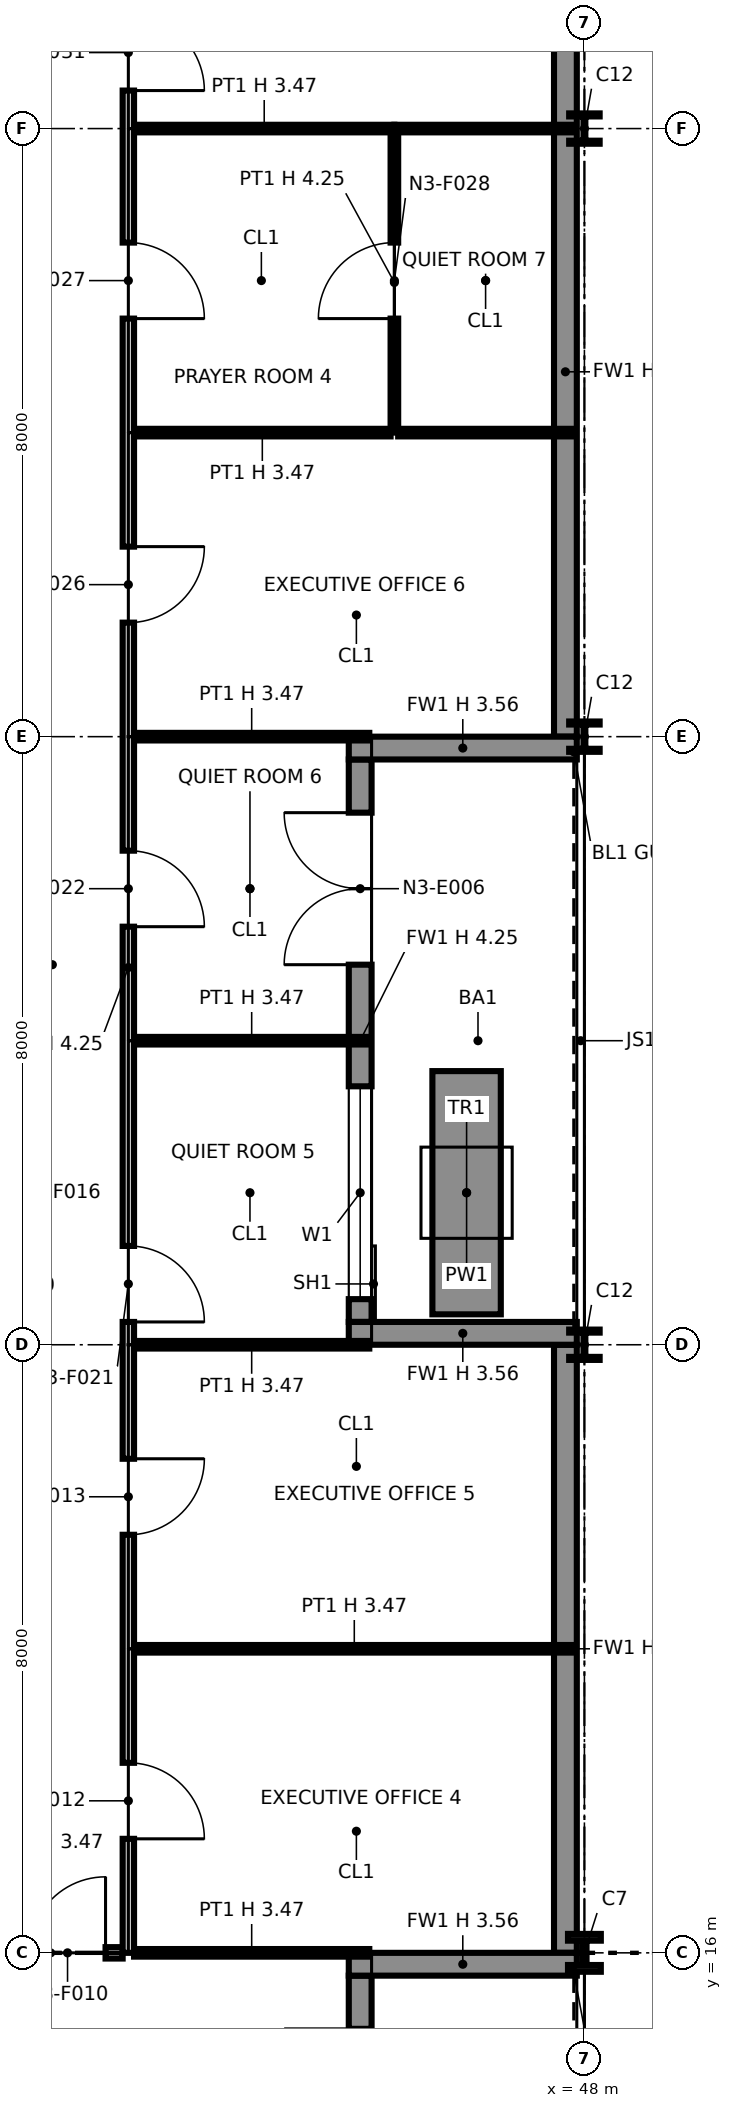
"""IFC4 building model, lengths in metres.
Left out: names, types, materials, properties, quantities, classifications, styles, units other than length and angle.
Written with IfcOpenShell. Run it as: python <this file> out.ifc"""

import sys

from ifc_helpers import new_model, si_unit, direction, frame, frame_2d, origin, origin_2d, place, context, subcontext, project, spatial, polyline, rectangle, i_section, outline, extrude, element, fill, save


model = new_model("IFC4")
c1 = context("Model", 3, precision=1e-05, world=origin(), true_north=direction((0.0, 1.0)))
c2 = subcontext(c1, "Body", "Model", "MODEL_VIEW")
j1 = project(units=[si_unit("LENGTHUNIT", "METRE"), si_unit("PLANEANGLEUNIT", "RADIAN")], contexts=[c1])
p1 = place(None, origin())
s1 = spatial("IfcSite", under=j1, at=p1, CompositionType="ELEMENT")
p2 = place(p1, origin())
s2 = spatial("IfcBuilding", under=s1, at=p2, CompositionType="ELEMENT")
p3 = place(p2, frame((0.0, 0.0, 70.0)))
s3 = spatial("IfcBuildingStorey", under=s2, at=p3, CompositionType="ELEMENT", Elevation=70.0)
p4 = place(p3, frame((48.0, 16.0, 0.0), z_axis=(0.0, 0.0, 1.0), x_axis=(1.0, 0.0, 0.0)))
e1 = element("IfcColumn", 1, at=p4, inside=s3, PredefinedType="COLUMN", context=c2, shape_type="SweptSolid", body=[
    extrude(i_section(OverallWidth=0.432, OverallDepth=0.498, WebThickness=0.056, FlangeThickness=0.089, at=origin_2d()), origin(), (0.0, 0.0, 1.0), 4.25),
])
for number, where, z_axis, x_axis in (
    (2, (48.0, 24.0, 0.0), (0.0, 0.0, 1.0), (1.0, 0.0, 0.0)),
    (3, (48.0, 32.0, 0.0), (0.0, 0.0, 1.0), (1.0, 0.0, 0.0)),
    (4, (48.0, 40.0, 0.0), (0.0, 0.0, 1.0), (1.0, 0.0, 0.0)),
):
    element("IfcColumn", number, at=place(p3, frame(where, z_axis=z_axis, x_axis=x_axis)), inside=s3, PredefinedType="COLUMN", context=c2, shape_type="SweptSolid", body=[
        extrude(i_section(OverallWidth=0.401, OverallDepth=0.399, WebThickness=0.025, FlangeThickness=0.04, at=origin_2d()), origin(), (0.0, 0.0, 1.0), 4.25),
    ])
p5 = place(p3, frame((45.05, 8.3, 0.0), z_axis=(0.0, 0.0, 1.0), x_axis=(0.0, 1.0, 0.0)))
e5 = element("IfcWall", 5, at=p5, inside=s3, PredefinedType="SOLIDWALL", context=c2, shape_type="SweptSolid", body=[
    extrude(rectangle(XDim=7.4, YDim=0.3, at=frame_2d((3.7, 0.0))), origin(), (0.0, 0.0, 1.0), 4.25),
])
p6 = place(p5, frame((0.3, 0.0, 0.9)))
e6 = element("IfcOpeningElement", 6, at=p6, cuts=e5, PredefinedType="OPENING", context=c2, shape_type="SweptSolid", body=[
    extrude(rectangle(XDim=2.8, YDim=2.2, at=frame_2d((1.4, 1.1))), frame((0.0, 0.16, 0.0), z_axis=(0.0, -1.0, 0.0), x_axis=(1.0, 0.0, 0.0)), (0.0, 0.0, 1.0), 0.32),
])
p7 = place(p5, frame((4.7, 0.0, 0.0)))
e7 = element("IfcOpeningElement", 7, at=p7, cuts=e5, PredefinedType="OPENING", context=c2, shape_type="SweptSolid", body=[
    extrude(rectangle(XDim=2.0, YDim=2.4, at=frame_2d((1.0, 1.2))), frame((0.0, 0.16, 0.0), z_axis=(0.0, -1.0, 0.0), x_axis=(1.0, 0.0, 0.0)), (0.0, 0.0, 1.0), 0.32),
])
p8 = place(p3, frame((47.9, 15.85, 0.0), z_axis=(0.0, 0.0, 1.0), x_axis=(-1.0, 0.0, 0.0)))
e8 = element("IfcWall", 8, at=p8, inside=s3, PredefinedType="SOLIDWALL", context=c2, shape_type="SweptSolid", body=[
    extrude(rectangle(XDim=3.0, YDim=0.3, at=frame_2d((1.5, 0.0))), origin(), (0.0, 0.0, 1.0), 3.556),
])
p9 = place(p3, frame((47.75, 16.0, 0.0), z_axis=(0.0, 0.0, 1.0), x_axis=(0.0, 1.0, 0.0)))
e9 = element("IfcWall", 9, at=p9, inside=s3, PredefinedType="SOLIDWALL", context=c2, shape_type="SweptSolid", body=[
    extrude(rectangle(XDim=8.0, YDim=0.3, at=frame_2d((4.0, 0.0))), origin(), (0.0, 0.0, 1.0), 4.25),
])
p10 = place(p3, frame((45.05, 24.3, 0.0), z_axis=(0.0, 0.0, 1.0), x_axis=(0.0, 1.0, 0.0)))
e10 = element("IfcWall", 10, at=p10, inside=s3, PredefinedType="SOLIDWALL", context=c2, shape_type="SweptSolid", body=[
    extrude(rectangle(XDim=7.4, YDim=0.3, at=frame_2d((3.7, 0.0))), origin(), (0.0, 0.0, 1.0), 4.25),
])
p11 = place(p10, frame((0.3, 0.0, 0.9)))
e11 = element("IfcOpeningElement", 11, at=p11, cuts=e10, PredefinedType="OPENING", context=c2, shape_type="SweptSolid", body=[
    extrude(rectangle(XDim=2.8, YDim=2.2, at=frame_2d((1.4, 1.1))), frame((0.0, 0.16, 0.0), z_axis=(0.0, -1.0, 0.0), x_axis=(1.0, 0.0, 0.0)), (0.0, 0.0, 1.0), 0.32),
])
p12 = place(p10, frame((4.7, 0.0, 0.0)))
e12 = element("IfcOpeningElement", 12, at=p12, cuts=e10, PredefinedType="OPENING", context=c2, shape_type="SweptSolid", body=[
    extrude(rectangle(XDim=2.0, YDim=2.4, at=frame_2d((1.0, 1.2))), frame((0.0, 0.16, 0.0), z_axis=(0.0, -1.0, 0.0), x_axis=(1.0, 0.0, 0.0)), (0.0, 0.0, 1.0), 0.32),
])
for number, where, z_axis, x_axis in (
    (13, (47.9, 24.15, 0.0), (0.0, 0.0, 1.0), (-1.0, 0.0, 0.0)),
    (14, (47.9, 31.85, 0.0), (0.0, 0.0, 1.0), (-1.0, 0.0, 0.0)),
):
    element("IfcWall", number, at=place(p3, frame(where, z_axis=z_axis, x_axis=x_axis)), inside=s3, PredefinedType="SOLIDWALL", context=c2, shape_type="SweptSolid", body=[
        extrude(rectangle(XDim=3.0, YDim=0.3, at=frame_2d((1.5, 0.0))), origin(), (0.0, 0.0, 1.0), 3.556),
    ])
p13 = place(p3, frame((47.75, 32.0, 0.0), z_axis=(0.0, 0.0, 1.0), x_axis=(0.0, 1.0, 0.0)))
e15 = element("IfcWall", 15, at=p13, inside=s3, PredefinedType="SOLIDWALL", context=c2, shape_type="SweptSolid", body=[
    extrude(rectangle(XDim=9.6, YDim=0.3, at=frame_2d((4.8, 0.0))), origin(), (0.0, 0.0, 1.0), 4.25),
])
p14 = place(p3, frame((46.45, 24.4, 0.0), z_axis=(0.0, 0.0, 1.0), x_axis=(0.0, 1.0, 0.0)))
e16 = element("IfcWall", 16, at=p14, inside=s3, PredefinedType="SOLIDWALL", context=c2, shape_type="SweptSolid", body=[
    extrude(rectangle(XDim=3.2, YDim=0.9, at=frame_2d((1.6, 0.0))), origin(), (0.0, 0.0, 1.0), 0.6),
])
p15 = place(p3, frame((40.03, 16.0, 0.0), z_axis=(0.0, 0.0, 1.0), x_axis=(1.0, 0.0, 0.0)))
e17 = element("IfcWall", 17, at=p15, inside=s3, PredefinedType="PARTITIONING", context=c2, shape_type="SweptSolid", body=[
    extrude(rectangle(XDim=1.895, YDim=0.15, at=frame_2d((0.948, 0.0))), origin(), (0.0, 0.0, 1.0), 3.47),
])
p16 = place(p15, frame((0.67, 0.0, 0.0)))
e18 = element("IfcOpeningElement", 18, at=p16, cuts=e17, PredefinedType="OPENING", context=c2, shape_type="SweptSolid", body=[
    extrude(rectangle(XDim=1.0, YDim=2.1, at=frame_2d((0.5, 1.05))), frame((0.0, 0.085, 0.0), z_axis=(0.0, -1.0, 0.0), x_axis=(1.0, 0.0, 0.0)), (0.0, 0.0, 1.0), 0.17),
])
p17 = place(p3, frame((42.075, 16.0, 0.0), z_axis=(0.0, 0.0, 1.0), x_axis=(1.0, 0.0, 0.0)))
e19 = element("IfcWall", 19, at=p17, inside=s3, PredefinedType="PARTITIONING", context=c2, shape_type="SweptSolid", body=[
    extrude(rectangle(XDim=3.095, YDim=0.1, at=frame_2d((1.547, 0.0))), origin(), (0.0, 0.0, 1.0), 3.47),
])
p18 = place(p3, frame((42.0, 16.0, 0.0), z_axis=(0.0, 0.0, 1.0), x_axis=(0.0, 1.0, 0.0)))
e20 = element("IfcWall", 20, at=p18, inside=s3, PredefinedType="PARTITIONING", context=c2, shape_type="SweptSolid", body=[
    extrude(outline(polyline([(0.0, 0.0), (25.925, 0.0), (25.925, 4.25), (24.3, 4.25), (24.298, 3.47), (23.702, 3.47), (23.7, 4.25), (20.3, 4.25), (20.298, 3.47), (19.702, 3.47), (19.7, 4.25), (16.3, 4.25), (16.298, 3.47), (15.702, 3.47), (15.7, 4.25), (12.3, 4.25), (12.298, 3.47), (11.702, 3.47), (11.7, 4.25), (8.3, 4.25), (8.298, 3.47), (7.702, 3.47), (7.7, 4.25), (4.3, 4.25), (4.298, 3.47), (3.702, 3.47), (3.7, 4.25), (0.0, 4.25), (0.0, 0.0)])), frame((0.0, 0.075, 0.0), z_axis=(0.0, -1.0, 0.0), x_axis=(1.0, 0.0, 0.0)), (0.0, 0.0, 1.0), 0.15),
])
p19 = place(p18, frame((2.5, 0.0, 0.0), z_axis=(0.0, 0.0, 1.0), x_axis=(-1.0, 0.0, 0.0)))
e21 = element("IfcOpeningElement", 21, at=p19, cuts=e20, PredefinedType="OPENING", context=c2, shape_type="SweptSolid", body=[
    extrude(rectangle(XDim=1.0, YDim=2.1, at=frame_2d((0.5, 1.05))), frame((0.0, 0.085, 0.0), z_axis=(0.0, -1.0, 0.0), x_axis=(1.0, 0.0, 0.0)), (0.0, 0.0, 1.0), 0.17),
])
p20 = place(p18, frame((6.5, 0.0, 0.0), z_axis=(0.0, 0.0, 1.0), x_axis=(-1.0, 0.0, 0.0)))
e22 = element("IfcOpeningElement", 22, at=p20, cuts=e20, PredefinedType="OPENING", context=c2, shape_type="SweptSolid", body=[
    extrude(rectangle(XDim=1.0, YDim=2.1, at=frame_2d((0.5, 1.05))), frame((0.0, 0.085, 0.0), z_axis=(0.0, -1.0, 0.0), x_axis=(1.0, 0.0, 0.0)), (0.0, 0.0, 1.0), 0.17),
])
p21 = place(p18, frame((9.3, 0.0, 0.0), z_axis=(0.0, 0.0, 1.0), x_axis=(-1.0, 0.0, 0.0)))
e23 = element("IfcOpeningElement", 23, at=p21, cuts=e20, PredefinedType="OPENING", context=c2, shape_type="SweptSolid", body=[
    extrude(rectangle(XDim=1.0, YDim=2.1, at=frame_2d((0.5, 1.05))), frame((0.0, 0.085, 0.0), z_axis=(0.0, -1.0, 0.0), x_axis=(1.0, 0.0, 0.0)), (0.0, 0.0, 1.0), 0.17),
])
p22 = place(p18, frame((14.5, 0.0, 0.0), z_axis=(0.0, 0.0, 1.0), x_axis=(-1.0, 0.0, 0.0)))
e24 = element("IfcOpeningElement", 24, at=p22, cuts=e20, PredefinedType="OPENING", context=c2, shape_type="SweptSolid", body=[
    extrude(rectangle(XDim=1.0, YDim=2.1, at=frame_2d((0.5, 1.05))), frame((0.0, 0.085, 0.0), z_axis=(0.0, -1.0, 0.0), x_axis=(1.0, 0.0, 0.0)), (0.0, 0.0, 1.0), 0.17),
])
p23 = place(p18, frame((18.5, 0.0, 0.0), z_axis=(0.0, 0.0, 1.0), x_axis=(-1.0, 0.0, 0.0)))
e25 = element("IfcOpeningElement", 25, at=p23, cuts=e20, PredefinedType="OPENING", context=c2, shape_type="SweptSolid", body=[
    extrude(rectangle(XDim=1.0, YDim=2.1, at=frame_2d((0.5, 1.05))), frame((0.0, 0.085, 0.0), z_axis=(0.0, -1.0, 0.0), x_axis=(1.0, 0.0, 0.0)), (0.0, 0.0, 1.0), 0.17),
])
p24 = place(p18, frame((22.5, 0.0, 0.0), z_axis=(0.0, 0.0, 1.0), x_axis=(-1.0, 0.0, 0.0)))
e26 = element("IfcOpeningElement", 26, at=p24, cuts=e20, PredefinedType="OPENING", context=c2, shape_type="SweptSolid", body=[
    extrude(rectangle(XDim=1.0, YDim=2.1, at=frame_2d((0.5, 1.05))), frame((0.0, 0.085, 0.0), z_axis=(0.0, -1.0, 0.0), x_axis=(1.0, 0.0, 0.0)), (0.0, 0.0, 1.0), 0.17),
])
p25 = place(p18, frame((25.5, 0.0, 0.0), z_axis=(0.0, 0.0, 1.0), x_axis=(-1.0, 0.0, 0.0)))
e27 = element("IfcOpeningElement", 27, at=p25, cuts=e20, PredefinedType="OPENING", context=c2, shape_type="SweptSolid", body=[
    extrude(rectangle(XDim=1.0, YDim=2.1, at=frame_2d((0.5, 1.05))), frame((0.0, 0.085, 0.0), z_axis=(0.0, -1.0, 0.0), x_axis=(1.0, 0.0, 0.0)), (0.0, 0.0, 1.0), 0.17),
])
p26 = place(p3, frame((42.075, 20.0, 0.0), z_axis=(0.0, 0.0, 1.0), x_axis=(1.0, 0.0, 0.0)))
e28 = element("IfcWall", 28, at=p26, inside=s3, PredefinedType="PARTITIONING", context=c2, shape_type="SweptSolid", body=[
    extrude(rectangle(XDim=5.795, YDim=0.1, at=frame_2d((2.897, 0.0))), origin(), (0.0, 0.0, 1.0), 3.47),
])
for number, where, z_axis, x_axis in (
    (29, (42.075, 24.0, 0.0), (0.0, 0.0, 1.0), (1.0, 0.0, 0.0)),
    (30, (42.075, 28.0, 0.0), (0.0, 0.0, 1.0), (1.0, 0.0, 0.0)),
    (31, (42.075, 32.0, 0.0), (0.0, 0.0, 1.0), (1.0, 0.0, 0.0)),
):
    element("IfcWall", number, at=place(p3, frame(where, z_axis=z_axis, x_axis=x_axis)), inside=s3, PredefinedType="PARTITIONING", context=c2, shape_type="SweptSolid", body=[
        extrude(rectangle(XDim=3.095, YDim=0.1, at=frame_2d((1.547, 0.0))), origin(), (0.0, 0.0, 1.0), 3.47),
    ])
p27 = place(p3, frame((42.075, 36.0, 0.0), z_axis=(0.0, 0.0, 1.0), x_axis=(1.0, 0.0, 0.0)))
e32 = element("IfcWall", 32, at=p27, inside=s3, PredefinedType="PARTITIONING", context=c2, shape_type="SweptSolid", body=[
    extrude(rectangle(XDim=3.375, YDim=0.1, at=frame_2d((1.688, 0.0))), origin(), (0.0, 0.0, 1.0), 3.47),
])
p28 = place(p3, frame((45.55, 36.0, 0.0), z_axis=(0.0, 0.0, 1.0), x_axis=(1.0, 0.0, 0.0)))
e33 = element("IfcWall", 33, at=p28, inside=s3, PredefinedType="PARTITIONING", context=c2, shape_type="SweptSolid", body=[
    extrude(rectangle(XDim=2.32, YDim=0.1, at=frame_2d((1.16, 0.0))), origin(), (0.0, 0.0, 1.0), 3.47),
])
p29 = place(p3, frame((45.5, 36.0, 0.0), z_axis=(0.0, 0.0, 1.0), x_axis=(0.0, 1.0, 0.0)))
e34 = element("IfcWall", 34, at=p29, inside=s3, PredefinedType="PARTITIONING", context=c2, shape_type="SweptSolid", body=[
    extrude(rectangle(XDim=3.95, YDim=0.1, at=frame_2d((1.975, 0.0))), origin(), (0.0, 0.0, 1.0), 4.25),
])
p30 = place(p29, frame((1.5, 0.0, 0.0)))
e35 = element("IfcOpeningElement", 35, at=p30, cuts=e34, PredefinedType="OPENING", context=c2, shape_type="SweptSolid", body=[
    extrude(rectangle(XDim=1.0, YDim=2.1, at=frame_2d((0.5, 1.05))), frame((0.0, 0.06, 0.0), z_axis=(0.0, -1.0, 0.0), x_axis=(1.0, 0.0, 0.0)), (0.0, 0.0, 1.0), 0.12),
])
p31 = place(p3, frame((42.075, 40.0, 0.0), z_axis=(0.0, 0.0, 1.0), x_axis=(1.0, 0.0, 0.0)))
e36 = element("IfcWall", 36, at=p31, inside=s3, PredefinedType="PARTITIONING", context=c2, shape_type="SweptSolid", body=[
    extrude(rectangle(XDim=3.425, YDim=0.1, at=frame_2d((1.712, 0.0))), origin(), (0.0, 0.0, 1.0), 3.47),
])
p32 = place(p3, frame((45.5, 40.0, 0.0), z_axis=(0.0, 0.0, 1.0), x_axis=(1.0, 0.0, 0.0)))
e37 = element("IfcWall", 37, at=p32, inside=s3, PredefinedType="PARTITIONING", context=c2, shape_type="SweptSolid", body=[
    extrude(rectangle(XDim=2.37, YDim=0.1, at=frame_2d((1.185, 0.0))), origin(), (0.0, 0.0, 1.0), 3.47),
])
p33 = place(p11, origin())
e38 = element("IfcWindow", 38, at=p33, inside=s3, PartitioningType="SINGLE_PANEL", PredefinedType="WINDOW", context=c2, shape_type="SweptSolid", body=[
    extrude(rectangle(XDim=2.8, YDim=2.2, at=frame_2d((1.4, 1.1))), frame((0.0, 0.03, 0.0), z_axis=(0.0, -1.0, 0.0), x_axis=(1.0, 0.0, 0.0)), (0.0, 0.0, 1.0), 0.06),
])
fill(e11, e38)
p34 = place(p12, origin())
e39 = element("IfcDoor", 39, at=p34, inside=s3, OperationType="DOUBLE_DOOR_SINGLE_SWING", PredefinedType="DOOR", context=c2, shape_type="SweptSolid", body=[
    extrude(rectangle(XDim=2.0, YDim=2.4, at=frame_2d((1.0, 1.2))), frame((0.0, 0.025, 0.0), z_axis=(0.0, -1.0, 0.0), x_axis=(1.0, 0.0, 0.0)), (0.0, 0.0, 1.0), 0.05),
])
fill(e12, e39)
p35 = place(p16, origin())
e40 = element("IfcDoor", 40, at=p35, inside=s3, OperationType="SINGLE_SWING_RIGHT", PredefinedType="DOOR", context=c2, shape_type="SweptSolid", body=[
    extrude(rectangle(XDim=1.0, YDim=2.1, at=frame_2d((0.5, 1.05))), frame((0.0, 0.025, 0.0), z_axis=(0.0, -1.0, 0.0), x_axis=(1.0, 0.0, 0.0)), (0.0, 0.0, 1.0), 0.05),
])
fill(e18, e40)
p36 = place(p19, origin())
e41 = element("IfcDoor", 41, at=p36, inside=s3, OperationType="SINGLE_SWING_RIGHT", PredefinedType="DOOR", context=c2, shape_type="SweptSolid", body=[
    extrude(rectangle(XDim=1.0, YDim=2.1, at=frame_2d((0.5, 1.05))), frame((0.0, 0.025, 0.0), z_axis=(0.0, -1.0, 0.0), x_axis=(1.0, 0.0, 0.0)), (0.0, 0.0, 1.0), 0.05),
])
fill(e21, e41)
p37 = place(p20, origin())
e42 = element("IfcDoor", 42, at=p37, inside=s3, OperationType="SINGLE_SWING_LEFT", PredefinedType="DOOR", context=c2, shape_type="SweptSolid", body=[
    extrude(rectangle(XDim=1.0, YDim=2.1, at=frame_2d((0.5, 1.05))), frame((0.0, 0.025, 0.0), z_axis=(0.0, -1.0, 0.0), x_axis=(1.0, 0.0, 0.0)), (0.0, 0.0, 1.0), 0.05),
])
fill(e22, e42)
p38 = place(p21, origin())
e43 = element("IfcDoor", 43, at=p38, inside=s3, OperationType="SINGLE_SWING_RIGHT", PredefinedType="DOOR", context=c2, shape_type="SweptSolid", body=[
    extrude(rectangle(XDim=1.0, YDim=2.1, at=frame_2d((0.5, 1.05))), frame((0.0, 0.025, 0.0), z_axis=(0.0, -1.0, 0.0), x_axis=(1.0, 0.0, 0.0)), (0.0, 0.0, 1.0), 0.05),
])
fill(e23, e43)
p39 = place(p22, origin())
e44 = element("IfcDoor", 44, at=p39, inside=s3, OperationType="SINGLE_SWING_RIGHT", PredefinedType="DOOR", context=c2, shape_type="SweptSolid", body=[
    extrude(rectangle(XDim=1.0, YDim=2.1, at=frame_2d((0.5, 1.05))), frame((0.0, 0.025, 0.0), z_axis=(0.0, -1.0, 0.0), x_axis=(1.0, 0.0, 0.0)), (0.0, 0.0, 1.0), 0.05),
])
fill(e24, e44)
p40 = place(p23, origin())
e45 = element("IfcDoor", 45, at=p40, inside=s3, OperationType="SINGLE_SWING_LEFT", PredefinedType="DOOR", context=c2, shape_type="SweptSolid", body=[
    extrude(rectangle(XDim=1.0, YDim=2.1, at=frame_2d((0.5, 1.05))), frame((0.0, 0.025, 0.0), z_axis=(0.0, -1.0, 0.0), x_axis=(1.0, 0.0, 0.0)), (0.0, 0.0, 1.0), 0.05),
])
fill(e25, e45)
p41 = place(p24, origin())
e46 = element("IfcDoor", 46, at=p41, inside=s3, OperationType="SINGLE_SWING_RIGHT", PredefinedType="DOOR", context=c2, shape_type="SweptSolid", body=[
    extrude(rectangle(XDim=1.0, YDim=2.1, at=frame_2d((0.5, 1.05))), frame((0.0, 0.025, 0.0), z_axis=(0.0, -1.0, 0.0), x_axis=(1.0, 0.0, 0.0)), (0.0, 0.0, 1.0), 0.05),
])
fill(e26, e46)
p42 = place(p30, origin())
e47 = element("IfcDoor", 47, at=p42, inside=s3, OperationType="SINGLE_SWING_LEFT", PredefinedType="DOOR", context=c2, shape_type="SweptSolid", body=[
    extrude(rectangle(XDim=1.0, YDim=2.1, at=frame_2d((0.5, 1.05))), frame((0.0, 0.025, 0.0), z_axis=(0.0, -1.0, 0.0), x_axis=(1.0, 0.0, 0.0)), (0.0, 0.0, 1.0), 0.05),
])
fill(e35, e47)
p43 = place(p25, origin())
e48 = element("IfcDoor", 48, at=p43, inside=s3, OperationType="SINGLE_SWING_RIGHT", PredefinedType="DOOR", context=c2, shape_type="SweptSolid", body=[
    extrude(rectangle(XDim=1.0, YDim=2.1, at=frame_2d((0.5, 1.05))), frame((0.0, 0.025, 0.0), z_axis=(0.0, -1.0, 0.0), x_axis=(1.0, 0.0, 0.0)), (0.0, 0.0, 1.0), 0.05),
])
fill(e27, e48)
save(model, sys.argv[1])
